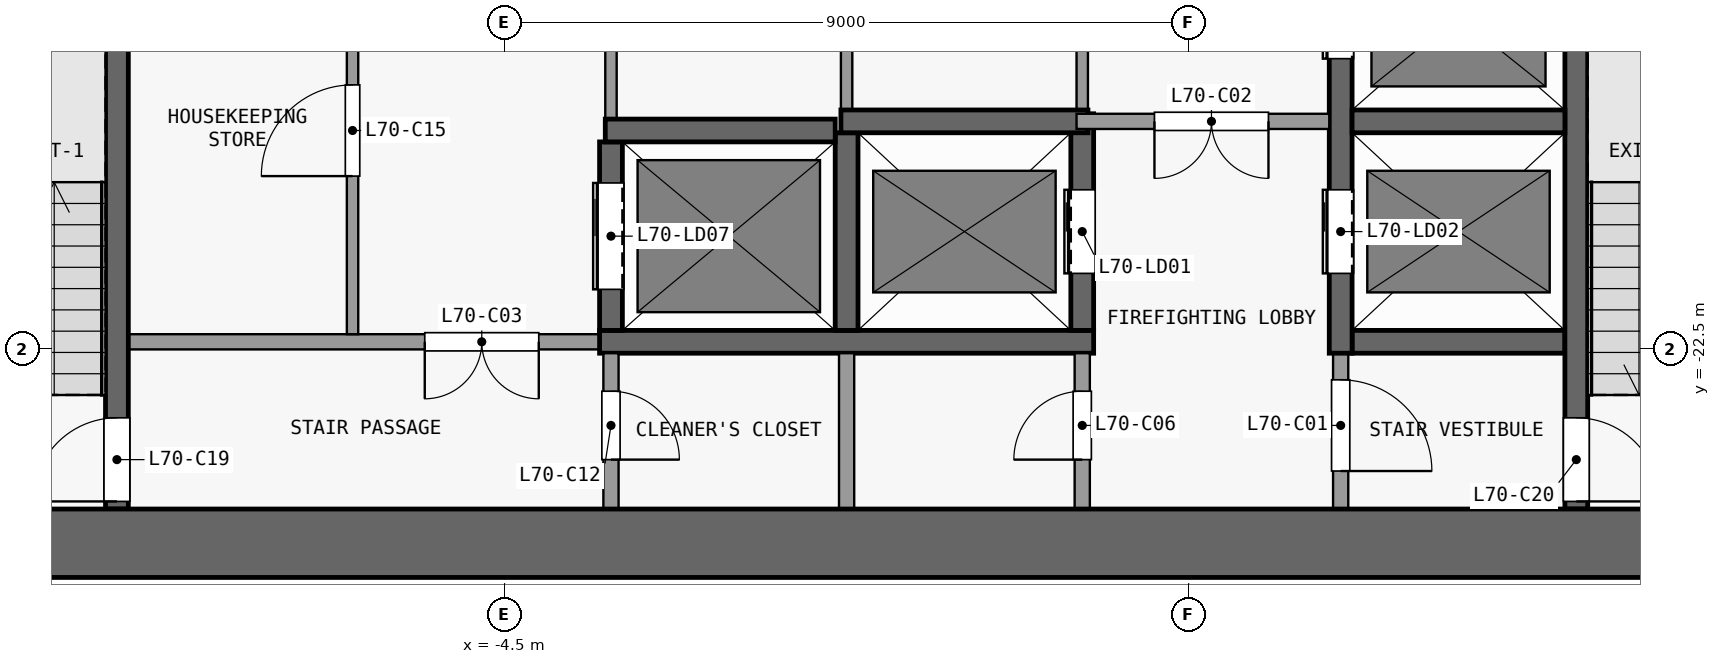
"""IFC4 building model, lengths in metres.
Left out: names, types, materials, properties, quantities, classifications, styles, units other than length and angle.
Written with IfcOpenShell. Run it as: python <this file> out.ifc"""

import sys

from ifc_helpers import new_model, si_unit, direction, frame, frame_2d, origin, place, context, subcontext, project, spatial, rectangle, extrude, element, fill, save


model = new_model("IFC4")
c1 = context("Model", 3, precision=1e-05, world=origin(), true_north=direction((0.0, 1.0)))
c2 = subcontext(c1, "Body", "Model", "MODEL_VIEW")
j1 = project(units=[si_unit("LENGTHUNIT", "METRE"), si_unit("PLANEANGLEUNIT", "RADIAN")], contexts=[c1])
p1 = place(None, origin())
s1 = spatial("IfcSite", under=j1, at=p1, CompositionType="ELEMENT")
p2 = place(p1, origin())
s2 = spatial("IfcBuilding", under=s1, at=p2, CompositionType="ELEMENT")
p3 = place(p2, frame((0.0, 0.0, 277.1)))
s3 = spatial("IfcBuildingStorey", under=s2, at=p3, CompositionType="ELEMENT", Elevation=277.1)
p4 = place(p3, frame((-13.1, -25.05, 0.0), z_axis=(0.0, 0.0, 1.0), x_axis=(1.0, 0.0, 0.0)))
e1 = element("IfcWall", 1, at=p4, inside=s3, PredefinedType="SHEAR", context=c2, shape_type="SweptSolid", body=[
    extrude(rectangle(XDim=26.2, YDim=0.9, at=frame_2d((13.1, 0.0))), origin(), (0.0, 0.0, 1.0), 3.3),
])
p5 = place(p3, frame((-3.25, -22.4, 0.0), z_axis=(0.0, 0.0, 1.0), x_axis=(-1.0, 0.0, 0.0)))
e2 = element("IfcWall", 2, at=p5, inside=s3, PredefinedType="PARTITIONING", context=c2, shape_type="SweptSolid", body=[
    extrude(rectangle(XDim=6.2, YDim=0.2, at=frame_2d((3.1, 0.0))), origin(), (0.0, 0.0, 1.0), 3.3),
])
p6 = place(p5, frame((0.8, 0.0, 0.0)))
e3 = element("IfcOpeningElement", 3, at=p6, cuts=e2, PredefinedType="OPENING", context=c2, shape_type="SweptSolid", body=[
    extrude(rectangle(XDim=1.5, YDim=2.1, at=frame_2d((0.75, 1.05))), frame((0.0, 0.11, 0.0), z_axis=(0.0, -1.0, 0.0), x_axis=(1.0, 0.0, 0.0)), (0.0, 0.0, 1.0), 0.22),
])
p7 = place(p3, frame((-3.25, -22.4, 0.0), z_axis=(0.0, 0.0, 1.0), x_axis=(1.0, 0.0, 0.0)))
e4 = element("IfcWall", 4, at=p7, inside=s3, PredefinedType="SHEAR", context=c2, shape_type="SweptSolid", body=[
    extrude(rectangle(XDim=6.5, YDim=0.3, at=frame_2d((3.25, 0.0))), origin(), (0.0, 0.0, 1.0), 3.3),
])
p8 = place(p3, frame((6.65, -22.4, 0.0), z_axis=(0.0, 0.0, 1.0), x_axis=(1.0, 0.0, 0.0)))
e5 = element("IfcWall", 5, at=p8, inside=s3, PredefinedType="SHEAR", context=c2, shape_type="SweptSolid", body=[
    extrude(rectangle(XDim=2.8, YDim=0.3, at=frame_2d((1.4, 0.0))), origin(), (0.0, 0.0, 1.0), 3.3),
])
p9 = place(p3, frame((-3.175, -19.62, 0.0), z_axis=(0.0, 0.0, 1.0), x_axis=(1.0, 0.0, 0.0)))
e6 = element("IfcWall", 6, at=p9, inside=s3, PredefinedType="SHEAR", context=c2, shape_type="SweptSolid", body=[
    extrude(rectangle(XDim=3.025, YDim=0.3, at=frame_2d((1.513, 0.0))), origin(), (0.0, 0.0, 1.0), 3.3),
])
p10 = place(p3, frame((-0.075, -19.5, 0.0), z_axis=(0.0, 0.0, 1.0), x_axis=(1.0, 0.0, 0.0)))
e7 = element("IfcWall", 7, at=p10, inside=s3, PredefinedType="SHEAR", context=c2, shape_type="SweptSolid", body=[
    extrude(rectangle(XDim=3.25, YDim=0.3, at=frame_2d((1.625, 0.0))), origin(), (0.0, 0.0, 1.0), 3.3),
])
p11 = place(p3, frame((6.35, -19.5, 0.0), z_axis=(0.0, 0.0, 1.0), x_axis=(-1.0, 0.0, 0.0)))
e8 = element("IfcWall", 8, at=p11, inside=s3, PredefinedType="PARTITIONING", context=c2, shape_type="SweptSolid", body=[
    extrude(rectangle(XDim=3.325, YDim=0.2, at=frame_2d((1.663, 0.0))), origin(), (0.0, 0.0, 1.0), 3.3),
])
p12 = place(p11, frame((0.8, 0.0, 0.0)))
e9 = element("IfcOpeningElement", 9, at=p12, cuts=e8, PredefinedType="OPENING", context=c2, shape_type="SweptSolid", body=[
    extrude(rectangle(XDim=1.5, YDim=2.1, at=frame_2d((0.75, 1.05))), frame((0.0, 0.11, 0.0), z_axis=(0.0, -1.0, 0.0), x_axis=(1.0, 0.0, 0.0)), (0.0, 0.0, 1.0), 0.22),
])
p13 = place(p3, frame((6.65, -19.5, 0.0), z_axis=(0.0, 0.0, 1.0), x_axis=(1.0, 0.0, 0.0)))
e10 = element("IfcWall", 10, at=p13, inside=s3, PredefinedType="SHEAR", context=c2, shape_type="SweptSolid", body=[
    extrude(rectangle(XDim=2.8, YDim=0.3, at=frame_2d((1.4, 0.0))), origin(), (0.0, 0.0, 1.0), 3.3),
])
p14 = place(p3, frame((-9.6, -24.6, 0.0), z_axis=(0.0, 0.0, 1.0), x_axis=(0.0, 1.0, 0.0)))
e11 = element("IfcWall", 11, at=p14, inside=s3, PredefinedType="SHEAR", context=c2, shape_type="SweptSolid", body=[
    extrude(rectangle(XDim=7.7, YDim=0.3, at=frame_2d((3.85, 0.0))), origin(), (0.0, 0.0, 1.0), 3.3),
])
p15 = place(p14, frame((0.1, 0.0, 0.0)))
e12 = element("IfcOpeningElement", 12, at=p15, cuts=e11, PredefinedType="OPENING", context=c2, shape_type="SweptSolid", body=[
    extrude(rectangle(XDim=1.1, YDim=2.1, at=frame_2d((0.55, 1.05))), frame((0.0, 0.16, 0.0), z_axis=(0.0, -1.0, 0.0), x_axis=(1.0, 0.0, 0.0)), (0.0, 0.0, 1.0), 0.32),
])
p16 = place(p3, frame((-6.5, -22.3, 0.0), z_axis=(0.0, 0.0, 1.0), x_axis=(0.0, 1.0, 0.0)))
e13 = element("IfcWall", 13, at=p16, inside=s3, PredefinedType="PARTITIONING", context=c2, shape_type="SweptSolid", body=[
    extrude(rectangle(XDim=8.14, YDim=0.15, at=frame_2d((4.07, 0.0))), origin(), (0.0, 0.0, 1.0), 3.3),
])
p17 = place(p16, frame((2.08, 0.0, 0.0)))
e14 = element("IfcOpeningElement", 14, at=p17, cuts=e13, PredefinedType="OPENING", context=c2, shape_type="SweptSolid", body=[
    extrude(rectangle(XDim=1.2, YDim=2.1, at=frame_2d((0.6, 1.05))), frame((0.0, 0.085, 0.0), z_axis=(0.0, -1.0, 0.0), x_axis=(1.0, 0.0, 0.0)), (0.0, 0.0, 1.0), 0.17),
])
p18 = place(p16, frame((6.4, 0.0, 0.0)))
e15 = element("IfcOpeningElement", 15, at=p18, cuts=e13, PredefinedType="OPENING", context=c2, shape_type="SweptSolid", body=[
    extrude(rectangle(XDim=0.9, YDim=2.1, at=frame_2d((0.45, 1.05))), frame((0.0, 0.085, 0.0), z_axis=(0.0, -1.0, 0.0), x_axis=(1.0, 0.0, 0.0)), (0.0, 0.0, 1.0), 0.17),
])
p19 = place(p3, frame((-3.1, -22.55, 0.0), z_axis=(0.0, 0.0, 1.0), x_axis=(0.0, -1.0, 0.0)))
e16 = element("IfcWall", 16, at=p19, inside=s3, PredefinedType="PARTITIONING", context=c2, shape_type="SweptSolid", body=[
    extrude(rectangle(XDim=2.05, YDim=0.2, at=frame_2d((1.025, 0.0))), origin(), (0.0, 0.0, 1.0), 3.3),
])
p20 = place(p19, frame((0.5, 0.0, 0.0)))
e17 = element("IfcOpeningElement", 17, at=p20, cuts=e16, PredefinedType="OPENING", context=c2, shape_type="SweptSolid", body=[
    extrude(rectangle(XDim=0.9, YDim=2.1, at=frame_2d((0.45, 1.05))), frame((0.0, 0.11, 0.0), z_axis=(0.0, -1.0, 0.0), x_axis=(1.0, 0.0, 0.0)), (0.0, 0.0, 1.0), 0.22),
])
p21 = place(p3, frame((-3.1, -22.25, 0.0), z_axis=(0.0, 0.0, 1.0), x_axis=(0.0, 1.0, 0.0)))
e18 = element("IfcWall", 18, at=p21, inside=s3, PredefinedType="SHEAR", context=c2, shape_type="SweptSolid", body=[
    extrude(rectangle(XDim=2.48, YDim=0.3, at=frame_2d((1.24, 0.0))), origin(), (0.0, 0.0, 1.0), 3.3),
])
p22 = place(p21, frame((0.54, 0.0, 0.0)))
e19 = element("IfcOpeningElement", 19, at=p22, cuts=e18, PredefinedType="OPENING", context=c2, shape_type="SweptSolid", body=[
    extrude(rectangle(XDim=1.4, YDim=2.1, at=frame_2d((0.7, 1.05))), frame((0.0, 0.16, 0.0), z_axis=(0.0, -1.0, 0.0), x_axis=(1.0, 0.0, 0.0)), (0.0, 0.0, 1.0), 0.32),
])
p23 = place(p3, frame((-3.1, -8.5, 0.0), z_axis=(0.0, 0.0, 1.0), x_axis=(0.0, -1.0, 0.0)))
e20 = element("IfcWall", 20, at=p23, inside=s3, PredefinedType="PARTITIONING", context=c2, shape_type="SweptSolid", body=[
    extrude(rectangle(XDim=10.97, YDim=0.15, at=frame_2d((5.485, 0.0))), origin(), (0.0, 0.0, 1.0), 3.3),
])
p24 = place(p23, frame((4.96, 0.0, 0.0)))
e21 = element("IfcOpeningElement", 21, at=p24, cuts=e20, PredefinedType="OPENING", context=c2, shape_type="SweptSolid", body=[
    extrude(rectangle(XDim=1.2, YDim=2.1, at=frame_2d((0.6, 1.05))), frame((0.0, 0.085, 0.0), z_axis=(0.0, -1.0, 0.0), x_axis=(1.0, 0.0, 0.0)), (0.0, 0.0, 1.0), 0.17),
])
p25 = place(p3, frame((0.0, -24.6, 0.0), z_axis=(0.0, 0.0, 1.0), x_axis=(0.0, 1.0, 0.0)))
e22 = element("IfcWall", 22, at=p25, inside=s3, PredefinedType="PARTITIONING", context=c2, shape_type="SweptSolid", body=[
    extrude(rectangle(XDim=2.05, YDim=0.2, at=frame_2d((1.025, 0.0))), origin(), (0.0, 0.0, 1.0), 3.3),
])
p26 = place(p3, frame((0.0, -22.25, 0.0), z_axis=(0.0, 0.0, 1.0), x_axis=(0.0, 1.0, 0.0)))
e23 = element("IfcWall", 23, at=p26, inside=s3, PredefinedType="SHEAR", context=c2, shape_type="SweptSolid", body=[
    extrude(rectangle(XDim=2.6, YDim=0.3, at=frame_2d((1.3, 0.0))), origin(), (0.0, 0.0, 1.0), 3.3),
])
p27 = place(p3, frame((0.0, -19.35, 0.0), z_axis=(0.0, 0.0, 1.0), x_axis=(0.0, 1.0, 0.0)))
e24 = element("IfcWall", 24, at=p27, inside=s3, PredefinedType="PARTITIONING", context=c2, shape_type="SweptSolid", body=[
    extrude(rectangle(XDim=10.85, YDim=0.15, at=frame_2d((5.425, 0.0))), origin(), (0.0, 0.0, 1.0), 3.3),
])
p28 = place(p3, frame((3.1, -24.6, 0.0), z_axis=(0.0, 0.0, 1.0), x_axis=(0.0, 1.0, 0.0)))
e25 = element("IfcWall", 25, at=p28, inside=s3, PredefinedType="PARTITIONING", context=c2, shape_type="SweptSolid", body=[
    extrude(rectangle(XDim=2.05, YDim=0.2, at=frame_2d((1.025, 0.0))), origin(), (0.0, 0.0, 1.0), 3.3),
])
p29 = place(p28, frame((0.65, 0.0, 0.0)))
e26 = element("IfcOpeningElement", 26, at=p29, cuts=e25, PredefinedType="OPENING", context=c2, shape_type="SweptSolid", body=[
    extrude(rectangle(XDim=0.9, YDim=2.1, at=frame_2d((0.45, 1.05))), frame((0.0, 0.11, 0.0), z_axis=(0.0, -1.0, 0.0), x_axis=(1.0, 0.0, 0.0)), (0.0, 0.0, 1.0), 0.22),
])
p30 = place(p3, frame((3.1, -22.25, 0.0), z_axis=(0.0, 0.0, 1.0), x_axis=(0.0, 1.0, 0.0)))
e27 = element("IfcWall", 27, at=p30, inside=s3, PredefinedType="SHEAR", context=c2, shape_type="SweptSolid", body=[
    extrude(rectangle(XDim=2.85, YDim=0.3, at=frame_2d((1.425, 0.0))), origin(), (0.0, 0.0, 1.0), 3.3),
])
p31 = place(p30, frame((0.75, 0.0, 0.0)))
e28 = element("IfcOpeningElement", 28, at=p31, cuts=e27, PredefinedType="OPENING", context=c2, shape_type="SweptSolid", body=[
    extrude(rectangle(XDim=1.1, YDim=2.1, at=frame_2d((0.55, 1.05))), frame((0.0, 0.16, 0.0), z_axis=(0.0, -1.0, 0.0), x_axis=(1.0, 0.0, 0.0)), (0.0, 0.0, 1.0), 0.32),
])
p32 = place(p3, frame((3.1, -19.4, 0.0), z_axis=(0.0, 0.0, 1.0), x_axis=(0.0, 1.0, 0.0)))
e29 = element("IfcWall", 29, at=p32, inside=s3, PredefinedType="PARTITIONING", context=c2, shape_type="SweptSolid", body=[
    extrude(rectangle(XDim=10.9, YDim=0.15, at=frame_2d((5.45, 0.0))), origin(), (0.0, 0.0, 1.0), 3.3),
])
p33 = place(p32, frame((4.8, 0.0, 0.0)))
e30 = element("IfcOpeningElement", 30, at=p33, cuts=e29, PredefinedType="OPENING", context=c2, shape_type="SweptSolid", body=[
    extrude(rectangle(XDim=1.2, YDim=2.1, at=frame_2d((0.6, 1.05))), frame((0.0, 0.085, 0.0), z_axis=(0.0, -1.0, 0.0), x_axis=(1.0, 0.0, 0.0)), (0.0, 0.0, 1.0), 0.17),
])
p34 = place(p3, frame((6.5, -22.55, 0.0), z_axis=(0.0, 0.0, 1.0), x_axis=(0.0, -1.0, 0.0)))
e31 = element("IfcWall", 31, at=p34, inside=s3, PredefinedType="PARTITIONING", context=c2, shape_type="SweptSolid", body=[
    extrude(rectangle(XDim=2.05, YDim=0.2, at=frame_2d((1.025, 0.0))), origin(), (0.0, 0.0, 1.0), 3.3),
])
p35 = place(p34, frame((0.35, 0.0, 0.0)))
e32 = element("IfcOpeningElement", 32, at=p35, cuts=e31, PredefinedType="OPENING", context=c2, shape_type="SweptSolid", body=[
    extrude(rectangle(XDim=1.2, YDim=2.1, at=frame_2d((0.6, 1.05))), frame((0.0, 0.11, 0.0), z_axis=(0.0, -1.0, 0.0), x_axis=(1.0, 0.0, 0.0)), (0.0, 0.0, 1.0), 0.22),
])
p36 = place(p3, frame((6.5, -22.55, 0.0), z_axis=(0.0, 0.0, 1.0), x_axis=(0.0, 1.0, 0.0)))
e33 = element("IfcWall", 33, at=p36, inside=s3, PredefinedType="SHEAR", context=c2, shape_type="SweptSolid", body=[
    extrude(rectangle(XDim=14.05, YDim=0.3, at=frame_2d((7.025, 0.0))), origin(), (0.0, 0.0, 1.0), 3.3),
])
p37 = place(p36, frame((1.05, 0.0, 0.0)))
e34 = element("IfcOpeningElement", 34, at=p37, cuts=e33, PredefinedType="OPENING", context=c2, shape_type="SweptSolid", body=[
    extrude(rectangle(XDim=1.1, YDim=2.1, at=frame_2d((0.55, 1.05))), frame((0.0, 0.16, 0.0), z_axis=(0.0, -1.0, 0.0), x_axis=(1.0, 0.0, 0.0)), (0.0, 0.0, 1.0), 0.32),
])
p38 = place(p36, frame((3.875, 0.0, 0.0)))
e35 = element("IfcOpeningElement", 35, at=p38, cuts=e33, PredefinedType="OPENING", context=c2, shape_type="SweptSolid", body=[
    extrude(rectangle(XDim=1.1, YDim=2.1, at=frame_2d((0.55, 1.05))), frame((0.0, 0.16, 0.0), z_axis=(0.0, -1.0, 0.0), x_axis=(1.0, 0.0, 0.0)), (0.0, 0.0, 1.0), 0.32),
])
p39 = place(p36, frame((6.625, 0.0, 0.0)))
e36 = element("IfcOpeningElement", 36, at=p39, cuts=e33, PredefinedType="OPENING", context=c2, shape_type="SweptSolid", body=[
    extrude(rectangle(XDim=1.1, YDim=2.1, at=frame_2d((0.55, 1.05))), frame((0.0, 0.16, 0.0), z_axis=(0.0, -1.0, 0.0), x_axis=(1.0, 0.0, 0.0)), (0.0, 0.0, 1.0), 0.32),
])
p40 = place(p36, frame((9.375, 0.0, 0.0)))
e37 = element("IfcOpeningElement", 37, at=p40, cuts=e33, PredefinedType="OPENING", context=c2, shape_type="SweptSolid", body=[
    extrude(rectangle(XDim=1.1, YDim=2.1, at=frame_2d((0.55, 1.05))), frame((0.0, 0.16, 0.0), z_axis=(0.0, -1.0, 0.0), x_axis=(1.0, 0.0, 0.0)), (0.0, 0.0, 1.0), 0.32),
])
p41 = place(p36, frame((12.125, 0.0, 0.0)))
e38 = element("IfcOpeningElement", 38, at=p41, cuts=e33, PredefinedType="OPENING", context=c2, shape_type="SweptSolid", body=[
    extrude(rectangle(XDim=1.1, YDim=2.1, at=frame_2d((0.55, 1.05))), frame((0.0, 0.16, 0.0), z_axis=(0.0, -1.0, 0.0), x_axis=(1.0, 0.0, 0.0)), (0.0, 0.0, 1.0), 0.32),
])
p42 = place(p3, frame((9.6, -16.9, 0.0), z_axis=(0.0, 0.0, 1.0), x_axis=(0.0, -1.0, 0.0)))
e39 = element("IfcWall", 39, at=p42, inside=s3, PredefinedType="SHEAR", context=c2, shape_type="SweptSolid", body=[
    extrude(rectangle(XDim=7.7, YDim=0.3, at=frame_2d((3.85, 0.0))), origin(), (0.0, 0.0, 1.0), 3.3),
])
p43 = place(p42, frame((6.5, 0.0, 0.0)))
e40 = element("IfcOpeningElement", 40, at=p43, cuts=e39, PredefinedType="OPENING", context=c2, shape_type="SweptSolid", body=[
    extrude(rectangle(XDim=1.1, YDim=2.1, at=frame_2d((0.55, 1.05))), frame((0.0, 0.16, 0.0), z_axis=(0.0, -1.0, 0.0), x_axis=(1.0, 0.0, 0.0)), (0.0, 0.0, 1.0), 0.32),
])
p44 = place(p31, origin())
e41 = element("IfcDoor", 41, at=p44, inside=s3, OperationType="DOUBLE_DOOR_SLIDING", PredefinedType="DOOR", context=c2, shape_type="SweptSolid", body=[
    extrude(rectangle(XDim=1.1, YDim=2.1, at=frame_2d((0.55, 1.05))), frame((0.0, 0.025, 0.0), z_axis=(0.0, -1.0, 0.0), x_axis=(1.0, 0.0, 0.0)), (0.0, 0.0, 1.0), 0.05),
])
fill(e28, e41)
p45 = place(p37, origin())
e42 = element("IfcDoor", 42, at=p45, inside=s3, OperationType="DOUBLE_DOOR_SLIDING", PredefinedType="DOOR", context=c2, shape_type="SweptSolid", body=[
    extrude(rectangle(XDim=1.1, YDim=2.1, at=frame_2d((0.55, 1.05))), frame((0.0, 0.025, 0.0), z_axis=(0.0, -1.0, 0.0), x_axis=(1.0, 0.0, 0.0)), (0.0, 0.0, 1.0), 0.05),
])
fill(e34, e42)
p46 = place(p38, origin())
e43 = element("IfcDoor", 43, at=p46, inside=s3, OperationType="DOUBLE_DOOR_SLIDING", PredefinedType="DOOR", context=c2, shape_type="SweptSolid", body=[
    extrude(rectangle(XDim=1.1, YDim=2.1, at=frame_2d((0.55, 1.05))), frame((0.0, 0.025, 0.0), z_axis=(0.0, -1.0, 0.0), x_axis=(1.0, 0.0, 0.0)), (0.0, 0.0, 1.0), 0.05),
])
fill(e35, e43)
p47 = place(p22, origin())
e44 = element("IfcDoor", 44, at=p47, inside=s3, OperationType="DOUBLE_DOOR_SLIDING", PredefinedType="DOOR", context=c2, shape_type="SweptSolid", body=[
    extrude(rectangle(XDim=1.4, YDim=2.1, at=frame_2d((0.7, 1.05))), frame((0.0, 0.025, 0.0), z_axis=(0.0, -1.0, 0.0), x_axis=(1.0, 0.0, 0.0)), (0.0, 0.0, 1.0), 0.05),
])
fill(e19, e44)
p48 = place(p35, origin())
e45 = element("IfcDoor", 45, at=p48, inside=s3, OperationType="SINGLE_SWING_RIGHT", PredefinedType="DOOR", context=c2, shape_type="SweptSolid", body=[
    extrude(rectangle(XDim=1.2, YDim=2.1, at=frame_2d((0.6, 1.05))), frame((0.0, 0.025, 0.0), z_axis=(0.0, -1.0, 0.0), x_axis=(1.0, 0.0, 0.0)), (0.0, 0.0, 1.0), 0.05),
])
fill(e32, e45)
p49 = place(p12, origin())
e46 = element("IfcDoor", 46, at=p49, inside=s3, OperationType="DOUBLE_DOOR_SINGLE_SWING", PredefinedType="DOOR", context=c2, shape_type="SweptSolid", body=[
    extrude(rectangle(XDim=1.5, YDim=2.1, at=frame_2d((0.75, 1.05))), frame((0.0, 0.025, 0.0), z_axis=(0.0, -1.0, 0.0), x_axis=(1.0, 0.0, 0.0)), (0.0, 0.0, 1.0), 0.05),
])
fill(e9, e46)
p50 = place(p6, origin())
e47 = element("IfcDoor", 47, at=p50, inside=s3, OperationType="DOUBLE_DOOR_SINGLE_SWING", PredefinedType="DOOR", context=c2, shape_type="SweptSolid", body=[
    extrude(rectangle(XDim=1.5, YDim=2.1, at=frame_2d((0.75, 1.05))), frame((0.0, 0.025, 0.0), z_axis=(0.0, -1.0, 0.0), x_axis=(1.0, 0.0, 0.0)), (0.0, 0.0, 1.0), 0.05),
])
fill(e3, e47)
p51 = place(p29, origin())
e48 = element("IfcDoor", 48, at=p51, inside=s3, OperationType="SINGLE_SWING_LEFT", PredefinedType="DOOR", context=c2, shape_type="SweptSolid", body=[
    extrude(rectangle(XDim=0.9, YDim=2.1, at=frame_2d((0.45, 1.05))), frame((0.0, 0.025, 0.0), z_axis=(0.0, -1.0, 0.0), x_axis=(1.0, 0.0, 0.0)), (0.0, 0.0, 1.0), 0.05),
])
fill(e26, e48)
p52 = place(p20, origin())
e49 = element("IfcDoor", 49, at=p52, inside=s3, OperationType="SINGLE_SWING_RIGHT", PredefinedType="DOOR", context=c2, shape_type="SweptSolid", body=[
    extrude(rectangle(XDim=0.9, YDim=2.1, at=frame_2d((0.45, 1.05))), frame((0.0, 0.025, 0.0), z_axis=(0.0, -1.0, 0.0), x_axis=(1.0, 0.0, 0.0)), (0.0, 0.0, 1.0), 0.05),
])
fill(e17, e49)
p53 = place(p17, origin())
e50 = element("IfcDoor", 50, at=p53, inside=s3, OperationType="SINGLE_SWING_LEFT", PredefinedType="DOOR", context=c2, shape_type="SweptSolid", body=[
    extrude(rectangle(XDim=1.2, YDim=2.1, at=frame_2d((0.6, 1.05))), frame((0.0, 0.025, 0.0), z_axis=(0.0, -1.0, 0.0), x_axis=(1.0, 0.0, 0.0)), (0.0, 0.0, 1.0), 0.05),
])
fill(e14, e50)
p54 = place(p15, origin())
e51 = element("IfcDoor", 51, at=p54, inside=s3, OperationType="SINGLE_SWING_LEFT", PredefinedType="DOOR", context=c2, shape_type="SweptSolid", body=[
    extrude(rectangle(XDim=1.1, YDim=2.1, at=frame_2d((0.55, 1.05))), frame((0.0, 0.025, 0.0), z_axis=(0.0, -1.0, 0.0), x_axis=(1.0, 0.0, 0.0)), (0.0, 0.0, 1.0), 0.05),
])
fill(e12, e51)
p55 = place(p43, origin())
e52 = element("IfcDoor", 52, at=p55, inside=s3, OperationType="SINGLE_SWING_RIGHT", PredefinedType="DOOR", context=c2, shape_type="SweptSolid", body=[
    extrude(rectangle(XDim=1.1, YDim=2.1, at=frame_2d((0.55, 1.05))), frame((0.0, 0.025, 0.0), z_axis=(0.0, -1.0, 0.0), x_axis=(1.0, 0.0, 0.0)), (0.0, 0.0, 1.0), 0.05),
])
fill(e40, e52)
save(model, sys.argv[1])
